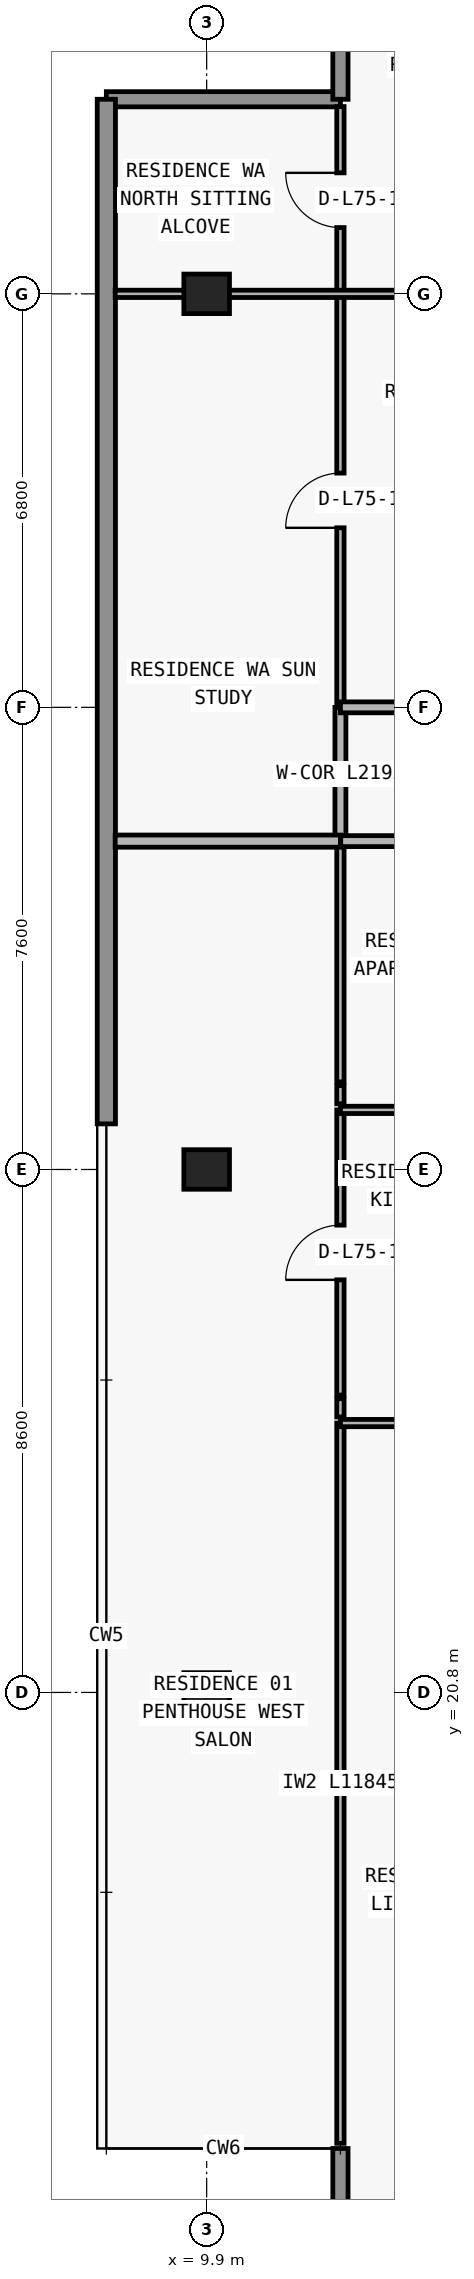
"""IFC4 building model, lengths in metres.
Left out: names, types, materials, properties, quantities, classifications, styles, units other than length and angle.
Written with IfcOpenShell. Run it as: python <this file> out.ifc"""

import sys

from ifc_helpers import new_model, si_unit, direction, frame, frame_2d, origin, origin_2d, place, context, subcontext, project, spatial, rectangle, extrude, element, fill, save


model = new_model("IFC4")
c1 = context("Model", 3, precision=1e-05, world=origin(), true_north=direction((0.0, 1.0)))
c2 = subcontext(c1, "Body", "Model", "MODEL_VIEW")
j1 = project(units=[si_unit("LENGTHUNIT", "METRE"), si_unit("PLANEANGLEUNIT", "RADIAN")], contexts=[c1])
p1 = place(None, origin())
s1 = spatial("IfcSite", under=j1, at=p1, CompositionType="ELEMENT")
p2 = place(p1, origin())
s2 = spatial("IfcBuilding", under=s1, at=p2, CompositionType="ELEMENT")
p3 = place(p2, frame((0.0, 0.0, 266.1)))
s3 = spatial("IfcBuildingStorey", under=s2, at=p3, CompositionType="ELEMENT", Elevation=266.1)
for number, where, z_axis, x_axis in (
    (1, (9.9, 20.8, 0.0), (0.0, 0.0, 1.0), (1.0, 0.0, 0.0)),
    (2, (9.9, 29.4, 0.0), (0.0, 0.0, 1.0), (1.0, 0.0, 0.0)),
    (3, (9.9, 43.8, 0.0), (0.0, 0.0, 1.0), (1.0, 0.0, 0.0)),
):
    element("IfcColumn", number, at=place(p3, frame(where, z_axis=z_axis, x_axis=x_axis)), inside=s3, PredefinedType="COLUMN", context=c2, shape_type="SweptSolid", body=[
        extrude(rectangle(XDim=0.75, YDim=0.65, at=origin_2d()), origin(), (0.0, 0.0, 1.0), 3.0),
    ])
p4 = place(p3, frame((12.1, 13.3, 0.0), z_axis=(0.0, 0.0, 1.0), x_axis=(0.0, -1.0, 0.0)))
e4 = element("IfcWall", 4, at=p4, inside=s3, PredefinedType="ELEMENTEDWALL", context=c2, shape_type="SweptSolid", body=[
    extrude(rectangle(XDim=3.45, YDim=0.25, at=frame_2d((1.725, 0.0))), origin(), (0.0, 0.0, 1.0), 3.0),
])
p5 = place(p3, frame((8.25, 47.0, 0.0), z_axis=(0.0, 0.0, 1.0), x_axis=(1.0, 0.0, 0.0)))
e5 = element("IfcWall", 5, at=p5, inside=s3, PredefinedType="ELEMENTEDWALL", context=c2, shape_type="SweptSolid", body=[
    extrude(rectangle(XDim=3.85, YDim=0.25, at=frame_2d((1.925, 0.0))), origin(), (0.0, 0.0, 1.0), 3.0),
])
p6 = place(p3, frame((12.1, 47.0, 0.0), z_axis=(0.0, 0.0, 1.0), x_axis=(0.0, 1.0, 0.0)))
e6 = element("IfcWall", 6, at=p6, inside=s3, PredefinedType="ELEMENTEDWALL", context=c2, shape_type="SweptSolid", body=[
    extrude(rectangle(XDim=3.45, YDim=0.25, at=frame_2d((1.725, 0.0))), origin(), (0.0, 0.0, 1.0), 3.0),
])
p7 = place(p3, frame((8.25, 30.15, 0.0), z_axis=(0.0, 0.0, 1.0), x_axis=(0.0, 1.0, 0.0)))
e7 = element("IfcWall", 7, at=p7, inside=s3, PredefinedType="STANDARD", context=c2, shape_type="SweptSolid", body=[
    extrude(rectangle(XDim=16.85, YDim=0.3, at=frame_2d((8.425, 0.0))), origin(), (0.0, 0.0, 1.0), 3.0),
])
p8 = place(p3, frame((12.1, 13.385, 0.0), z_axis=(0.0, 0.0, 1.0), x_axis=(0.0, 1.0, 0.0)))
e8 = element("IfcWall", 8, at=p8, inside=s3, PredefinedType="PARTITIONING", context=c2, shape_type="SweptSolid", body=[
    extrude(rectangle(XDim=11.845, YDim=0.12, at=frame_2d((5.922, 0.0))), origin(), (0.0, 0.0, 1.0), 3.0),
])
p9 = place(p3, frame((12.1, 25.33, 0.0), z_axis=(0.0, 0.0, 1.0), x_axis=(0.0, 1.0, 0.0)))
e9 = element("IfcWall", 9, at=p9, inside=s3, PredefinedType="PARTITIONING", context=c2, shape_type="SweptSolid", body=[
    extrude(rectangle(XDim=0.3, YDim=0.12, at=frame_2d((0.15, 0.0))), origin(), (0.0, 0.0, 1.0), 3.0),
])
p10 = place(p3, frame((12.1, 25.69, 0.0), z_axis=(0.0, 0.0, 1.0), x_axis=(0.0, 1.0, 0.0)))
e10 = element("IfcWall", 10, at=p10, inside=s3, PredefinedType="PARTITIONING", context=c2, shape_type="SweptSolid", body=[
    extrude(rectangle(XDim=4.69, YDim=0.12, at=frame_2d((2.345, 0.0))), origin(), (0.0, 0.0, 1.0), 3.0),
])
p11 = place(p10, frame((1.895, 0.0, 0.0)))
e11 = element("IfcOpeningElement", 11, at=p11, cuts=e10, PredefinedType="OPENING", context=c2, shape_type="SweptSolid", body=[
    extrude(rectangle(XDim=0.9, YDim=2.15, at=frame_2d((0.45, 1.075))), frame((0.0, 0.07, 0.0), z_axis=(0.0, -1.0, 0.0), x_axis=(1.0, 0.0, 0.0)), (0.0, 0.0, 1.0), 0.14),
])
p12 = place(p3, frame((12.1, 30.48, 0.0), z_axis=(0.0, 0.0, 1.0), x_axis=(0.0, 1.0, 0.0)))
e12 = element("IfcWall", 12, at=p12, inside=s3, PredefinedType="PARTITIONING", context=c2, shape_type="SweptSolid", body=[
    extrude(rectangle(XDim=0.3, YDim=0.12, at=frame_2d((0.15, 0.0))), origin(), (0.0, 0.0, 1.0), 3.0),
])
p13 = place(p3, frame((12.1, 30.84, 0.0), z_axis=(0.0, 0.0, 1.0), x_axis=(0.0, 1.0, 0.0)))
e13 = element("IfcWall", 13, at=p13, inside=s3, PredefinedType="PARTITIONING", context=c2, shape_type="SweptSolid", body=[
    extrude(rectangle(XDim=3.96, YDim=0.12, at=frame_2d((1.98, 0.0))), origin(), (0.0, 0.0, 1.0), 3.0),
])
p14 = place(p3, frame((12.1, 34.805, 0.0), z_axis=(0.0, 0.0, 1.0), x_axis=(0.0, 1.0, 0.0)))
e14 = element("IfcWall", 14, at=p14, inside=s3, PredefinedType="PARTITIONING", context=c2, shape_type="SweptSolid", body=[
    extrude(rectangle(XDim=2.195, YDim=0.18, at=frame_2d((1.098, 0.0))), origin(), (0.0, 0.0, 1.0), 3.0),
])
p15 = place(p3, frame((12.1, 37.005, 0.0), z_axis=(0.0, 0.0, 1.0), x_axis=(0.0, 1.0, 0.0)))
e15 = element("IfcWall", 15, at=p15, inside=s3, PredefinedType="PARTITIONING", context=c2, shape_type="SweptSolid", body=[
    extrude(rectangle(XDim=9.875, YDim=0.12, at=frame_2d((4.938, 0.0))), origin(), (0.0, 0.0, 1.0), 3.0),
])
p16 = place(p15, frame((2.948, 0.0, 0.0)))
e16 = element("IfcOpeningElement", 16, at=p16, cuts=e15, PredefinedType="OPENING", context=c2, shape_type="SweptSolid", body=[
    extrude(rectangle(XDim=0.9, YDim=2.15, at=frame_2d((0.45, 1.075))), frame((0.0, 0.07, 0.0), z_axis=(0.0, -1.0, 0.0), x_axis=(1.0, 0.0, 0.0)), (0.0, 0.0, 1.0), 0.14),
])
p17 = place(p15, frame((7.885, 0.0, 0.0)))
e17 = element("IfcOpeningElement", 17, at=p17, cuts=e15, PredefinedType="OPENING", context=c2, shape_type="SweptSolid", body=[
    extrude(rectangle(XDim=0.9, YDim=2.15, at=frame_2d((0.45, 1.075))), frame((0.0, 0.07, 0.0), z_axis=(0.0, -1.0, 0.0), x_axis=(1.0, 0.0, 0.0)), (0.0, 0.0, 1.0), 0.14),
])
p18 = place(p3, frame((12.1, 25.23, 0.0), z_axis=(0.0, 0.0, 1.0), x_axis=(1.0, 0.0, 0.0)))
e18 = element("IfcWall", 18, at=p18, inside=s3, PredefinedType="PARTITIONING", context=c2, shape_type="SweptSolid", body=[
    extrude(rectangle(XDim=3.098, YDim=0.12, at=frame_2d((1.549, 0.0))), origin(), (0.0, 0.0, 1.0), 3.0),
])
p19 = place(p18, frame((1.099, 0.0, 0.0)))
e19 = element("IfcOpeningElement", 19, at=p19, cuts=e18, PredefinedType="OPENING", context=c2, shape_type="SweptSolid", body=[
    extrude(rectangle(XDim=0.9, YDim=2.15, at=frame_2d((0.45, 1.075))), frame((0.0, 0.07, 0.0), z_axis=(0.0, -1.0, 0.0), x_axis=(1.0, 0.0, 0.0)), (0.0, 0.0, 1.0), 0.14),
])
p20 = place(p3, frame((12.1, 30.38, 0.0), z_axis=(0.0, 0.0, 1.0), x_axis=(1.0, 0.0, 0.0)))
e20 = element("IfcWall", 20, at=p20, inside=s3, PredefinedType="PARTITIONING", context=c2, shape_type="SweptSolid", body=[
    extrude(rectangle(XDim=3.098, YDim=0.12, at=frame_2d((1.549, 0.0))), origin(), (0.0, 0.0, 1.0), 3.0),
])
p21 = place(p20, frame((1.099, 0.0, 0.0)))
e21 = element("IfcOpeningElement", 21, at=p21, cuts=e20, PredefinedType="OPENING", context=c2, shape_type="SweptSolid", body=[
    extrude(rectangle(XDim=0.9, YDim=2.15, at=frame_2d((0.45, 1.075))), frame((0.0, 0.07, 0.0), z_axis=(0.0, -1.0, 0.0), x_axis=(1.0, 0.0, 0.0)), (0.0, 0.0, 1.0), 0.14),
])
p22 = place(p3, frame((8.395, 34.8, 0.0), z_axis=(0.0, 0.0, 1.0), x_axis=(1.0, 0.0, 0.0)))
e22 = element("IfcWall", 22, at=p22, inside=s3, PredefinedType="PARTITIONING", context=c2, shape_type="SweptSolid", body=[
    extrude(rectangle(XDim=3.705, YDim=0.2, at=frame_2d((1.853, 0.0))), origin(), (0.0, 0.0, 1.0), 3.0),
])
p23 = place(p3, frame((12.105, 34.8, 0.0), z_axis=(0.0, 0.0, 1.0), x_axis=(1.0, 0.0, 0.0)))
e23 = element("IfcWall", 23, at=p23, inside=s3, PredefinedType="PARTITIONING", context=c2, shape_type="SweptSolid", body=[
    extrude(rectangle(XDim=3.093, YDim=0.18, at=frame_2d((1.546, 0.0))), origin(), (0.0, 0.0, 1.0), 3.0),
])
p24 = place(p23, frame((1.046, 0.0, 0.0)))
e24 = element("IfcOpeningElement", 24, at=p24, cuts=e23, PredefinedType="OPENING", context=c2, shape_type="SweptSolid", body=[
    extrude(rectangle(XDim=1.0, YDim=2.2, at=frame_2d((0.5, 1.1))), frame((0.0, 0.1, 0.0), z_axis=(0.0, -1.0, 0.0), x_axis=(1.0, 0.0, 0.0)), (0.0, 0.0, 1.0), 0.2),
])
p25 = place(p3, frame((12.1, 37.0, 0.0), z_axis=(0.0, 0.0, 1.0), x_axis=(1.0, 0.0, 0.0)))
e25 = element("IfcWall", 25, at=p25, inside=s3, PredefinedType="PARTITIONING", context=c2, shape_type="SweptSolid", body=[
    extrude(rectangle(XDim=3.098, YDim=0.18, at=frame_2d((1.549, 0.0))), origin(), (0.0, 0.0, 1.0), 3.0),
])
p26 = place(p25, frame((1.049, 0.0, 0.0)))
e26 = element("IfcOpeningElement", 26, at=p26, cuts=e25, PredefinedType="OPENING", context=c2, shape_type="SweptSolid", body=[
    extrude(rectangle(XDim=1.0, YDim=2.2, at=frame_2d((0.5, 1.1))), frame((0.0, 0.1, 0.0), z_axis=(0.0, -1.0, 0.0), x_axis=(1.0, 0.0, 0.0)), (0.0, 0.0, 1.0), 0.2),
])
p27 = place(p3, frame((8.395, 43.8, 0.0), z_axis=(0.0, 0.0, 1.0), x_axis=(1.0, 0.0, 0.0)))
e27 = element("IfcWall", 27, at=p27, inside=s3, PredefinedType="PARTITIONING", context=c2, shape_type="SweptSolid", body=[
    extrude(rectangle(XDim=6.803, YDim=0.12, at=frame_2d((3.401, 0.0))), origin(), (0.0, 0.0, 1.0), 2.368),
])
p28 = place(p27, frame((4.804, 0.0, 0.0)))
e28 = element("IfcOpeningElement", 28, at=p28, cuts=e27, PredefinedType="OPENING", context=c2, shape_type="SweptSolid", body=[
    extrude(rectangle(XDim=0.9, YDim=2.15, at=frame_2d((0.45, 1.075))), frame((0.0, 0.07, 0.0), z_axis=(0.0, -1.0, 0.0), x_axis=(1.0, 0.0, 0.0)), (0.0, 0.0, 1.0), 0.14),
])
p29 = place(p11, origin())
e29 = element("IfcDoor", 29, at=p29, inside=s3, OperationType="SINGLE_SWING_LEFT", PredefinedType="DOOR", context=c2, shape_type="SweptSolid", body=[
    extrude(rectangle(XDim=0.9, YDim=2.15, at=frame_2d((0.45, 1.075))), frame((0.0, 0.025, 0.0), z_axis=(0.0, -1.0, 0.0), x_axis=(1.0, 0.0, 0.0)), (0.0, 0.0, 1.0), 0.05),
])
fill(e11, e29)
p30 = place(p16, origin())
e30 = element("IfcDoor", 30, at=p30, inside=s3, OperationType="SINGLE_SWING_LEFT", PredefinedType="DOOR", context=c2, shape_type="SweptSolid", body=[
    extrude(rectangle(XDim=0.9, YDim=2.15, at=frame_2d((0.45, 1.075))), frame((0.0, 0.025, 0.0), z_axis=(0.0, -1.0, 0.0), x_axis=(1.0, 0.0, 0.0)), (0.0, 0.0, 1.0), 0.05),
])
fill(e16, e30)
p31 = place(p17, origin())
e31 = element("IfcDoor", 31, at=p31, inside=s3, OperationType="SINGLE_SWING_RIGHT", PredefinedType="DOOR", context=c2, shape_type="SweptSolid", body=[
    extrude(rectangle(XDim=0.9, YDim=2.15, at=frame_2d((0.45, 1.075))), frame((0.0, 0.025, 0.0), z_axis=(0.0, -1.0, 0.0), x_axis=(1.0, 0.0, 0.0)), (0.0, 0.0, 1.0), 0.05),
])
fill(e17, e31)
save(model, sys.argv[1])
